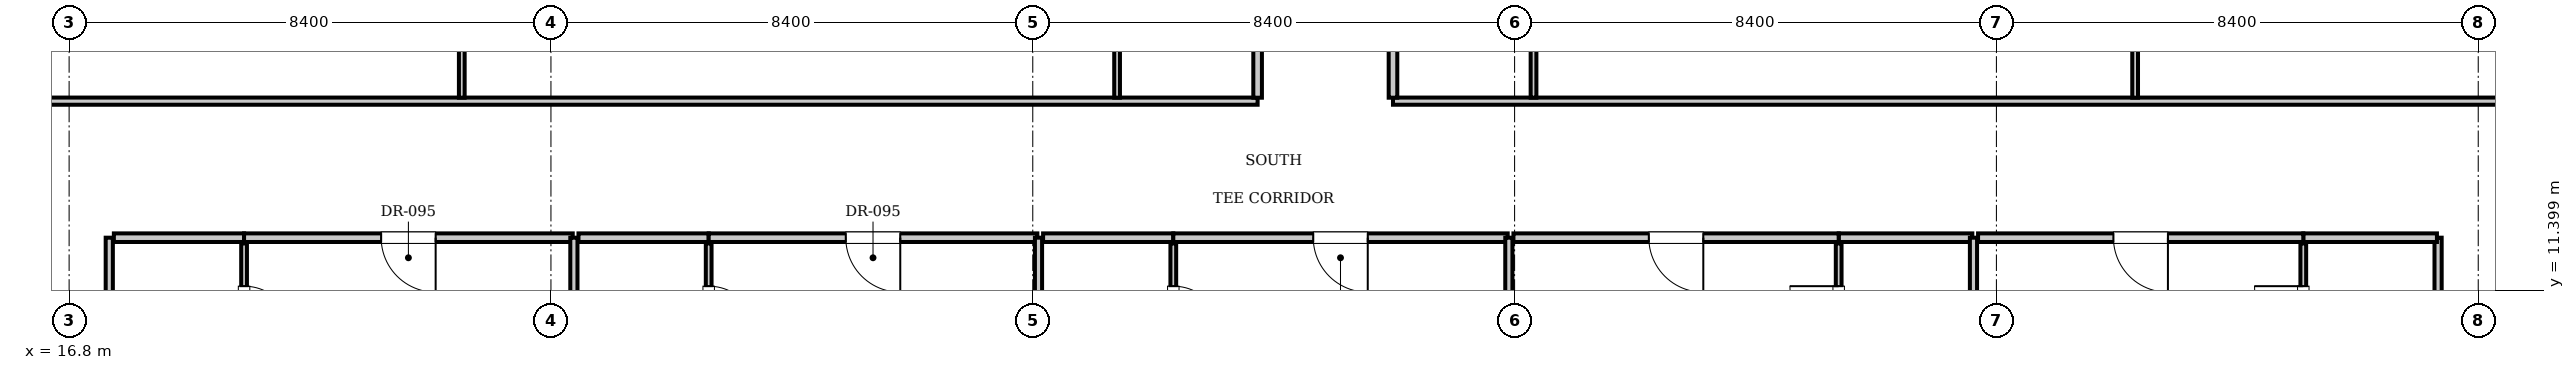
"""IFC4 building model, lengths in metres.
Left out: names, types, materials, properties, quantities, classifications, styles, units other than length and angle.
Written with IfcOpenShell. Run it as: python <this file> out.ifc"""

import sys

from ifc_helpers import new_model, si_unit, direction, frame, frame_2d, origin, place, context, subcontext, project, spatial, rectangle, extrude, element, fill, save


model = new_model("IFC4")
c1 = context("Model", 3, precision=1e-05, world=origin(), true_north=direction((0.0, 1.0)))
c2 = subcontext(c1, "Body", "Model", "MODEL_VIEW")
j1 = project(units=[si_unit("LENGTHUNIT", "METRE"), si_unit("PLANEANGLEUNIT", "RADIAN")], contexts=[c1])
p1 = place(None, origin())
s1 = spatial("IfcSite", under=j1, at=p1, CompositionType="ELEMENT")
p2 = place(p1, origin())
s2 = spatial("IfcBuilding", under=s1, at=p2, CompositionType="ELEMENT")
p3 = place(p2, frame((0.0, 0.0, 181.3)))
s3 = spatial("IfcBuildingStorey", under=s2, at=p3, CompositionType="ELEMENT", Elevation=181.3)
for number, where, z_axis, x_axis in (
    (1, (17.5, 9.0, 0.0), (0.0, 0.0, 1.0), (0.0, 1.0, 0.0)),
    (2, (58.1, 9.0, 0.0), (0.0, 0.0, 1.0), (0.0, 1.0, 0.0)),
):
    element("IfcWall", number, at=place(p3, frame(where, z_axis=z_axis, x_axis=x_axis)), inside=s3, PredefinedType="PARTITIONING", context=c2, shape_type="SweptSolid", body=[
        extrude(rectangle(XDim=3.32, YDim=0.125, at=frame_2d((1.66, 0.0))), origin(), (0.0, 0.0, 1.0), 3.61),
    ])
p4 = place(p3, frame((17.58, 12.32, 0.0), z_axis=(0.0, 0.0, 1.0), x_axis=(1.0, 0.0, 0.0)))
e3 = element("IfcWall", 3, at=p4, inside=s3, PredefinedType="PARTITIONING", context=c2, shape_type="SweptSolid", body=[
    extrude(rectangle(XDim=2.27, YDim=0.15, at=frame_2d((1.135, 0.0))), origin(), (0.0, 0.0, 1.0), 3.61),
])
p5 = place(p3, frame((19.85, 9.88, 0.0), z_axis=(0.0, 0.0, 1.0), x_axis=(0.0, 1.0, 0.0)))
e4 = element("IfcWall", 4, at=p5, inside=s3, PredefinedType="PARTITIONING", context=c2, shape_type="SweptSolid", body=[
    extrude(rectangle(XDim=2.34, YDim=0.1, at=frame_2d((1.17, 0.0))), origin(), (0.0, 0.0, 1.0), 3.61),
])
p6 = place(p5, frame((0.745, 0.0, 0.0)))
e5 = element("IfcOpeningElement", 5, at=p6, cuts=e4, PredefinedType="OPENING", context=c2, shape_type="SweptSolid", body=[
    extrude(rectangle(XDim=0.85, YDim=2.1, at=frame_2d((0.425, 1.05))), frame((0.0, 0.06, 0.0), z_axis=(0.0, -1.0, 0.0), x_axis=(1.0, 0.0, 0.0)), (0.0, 0.0, 1.0), 0.12),
])
p7 = place(p3, frame((19.85, 12.32, 0.0), z_axis=(0.0, 0.0, 1.0), x_axis=(1.0, 0.0, 0.0)))
e6 = element("IfcWall", 6, at=p7, inside=s3, PredefinedType="PARTITIONING", context=c2, shape_type="SweptSolid", body=[
    extrude(rectangle(XDim=5.73, YDim=0.15, at=frame_2d((2.865, 0.0))), origin(), (0.0, 0.0, 1.0), 3.61),
])
p8 = place(p7, frame((2.39, 0.0, 0.0)))
e7 = element("IfcOpeningElement", 7, at=p8, cuts=e6, PredefinedType="OPENING", context=c2, shape_type="SweptSolid", body=[
    extrude(rectangle(XDim=0.95, YDim=2.15, at=frame_2d((0.475, 1.075))), frame((0.0, 0.085, 0.0), z_axis=(0.0, -1.0, 0.0), x_axis=(1.0, 0.0, 0.0)), (0.0, 0.0, 1.0), 0.17),
])
p9 = place(p3, frame((25.6, 4.7, 0.0), z_axis=(0.0, 0.0, 1.0), x_axis=(0.0, 1.0, 0.0)))
e8 = element("IfcWall", 8, at=p9, inside=s3, PredefinedType="PARTITIONING", context=c2, shape_type="SweptSolid", body=[
    extrude(rectangle(XDim=7.62, YDim=0.125, at=frame_2d((3.81, 0.0))), origin(), (0.0, 0.0, 1.0), 3.61),
])
p10 = place(p3, frame((25.68, 12.32, 0.0), z_axis=(0.0, 0.0, 1.0), x_axis=(1.0, 0.0, 0.0)))
e9 = element("IfcWall", 9, at=p10, inside=s3, PredefinedType="PARTITIONING", context=c2, shape_type="SweptSolid", body=[
    extrude(rectangle(XDim=2.27, YDim=0.15, at=frame_2d((1.135, 0.0))), origin(), (0.0, 0.0, 1.0), 3.61),
])
p11 = place(p3, frame((27.95, 9.88, 0.0), z_axis=(0.0, 0.0, 1.0), x_axis=(0.0, 1.0, 0.0)))
e10 = element("IfcWall", 10, at=p11, inside=s3, PredefinedType="PARTITIONING", context=c2, shape_type="SweptSolid", body=[
    extrude(rectangle(XDim=2.34, YDim=0.1, at=frame_2d((1.17, 0.0))), origin(), (0.0, 0.0, 1.0), 3.61),
])
p12 = place(p11, frame((0.745, 0.0, 0.0)))
e11 = element("IfcOpeningElement", 11, at=p12, cuts=e10, PredefinedType="OPENING", context=c2, shape_type="SweptSolid", body=[
    extrude(rectangle(XDim=0.85, YDim=2.1, at=frame_2d((0.425, 1.05))), frame((0.0, 0.06, 0.0), z_axis=(0.0, -1.0, 0.0), x_axis=(1.0, 0.0, 0.0)), (0.0, 0.0, 1.0), 0.12),
])
p13 = place(p3, frame((27.95, 12.32, 0.0), z_axis=(0.0, 0.0, 1.0), x_axis=(1.0, 0.0, 0.0)))
e12 = element("IfcWall", 12, at=p13, inside=s3, PredefinedType="PARTITIONING", context=c2, shape_type="SweptSolid", body=[
    extrude(rectangle(XDim=5.73, YDim=0.15, at=frame_2d((2.865, 0.0))), origin(), (0.0, 0.0, 1.0), 3.61),
])
p14 = place(p13, frame((2.39, 0.0, 0.0)))
e13 = element("IfcOpeningElement", 13, at=p14, cuts=e12, PredefinedType="OPENING", context=c2, shape_type="SweptSolid", body=[
    extrude(rectangle(XDim=0.95, YDim=2.15, at=frame_2d((0.475, 1.075))), frame((0.0, 0.085, 0.0), z_axis=(0.0, -1.0, 0.0), x_axis=(1.0, 0.0, 0.0)), (0.0, 0.0, 1.0), 0.17),
])
p15 = place(p3, frame((33.7, 4.7, 0.0), z_axis=(0.0, 0.0, 1.0), x_axis=(0.0, 1.0, 0.0)))
e14 = element("IfcWall", 14, at=p15, inside=s3, PredefinedType="PARTITIONING", context=c2, shape_type="SweptSolid", body=[
    extrude(rectangle(XDim=7.62, YDim=0.125, at=frame_2d((3.81, 0.0))), origin(), (0.0, 0.0, 1.0), 3.007),
])
p16 = place(p3, frame((33.78, 12.32, 0.0), z_axis=(0.0, 0.0, 1.0), x_axis=(1.0, 0.0, 0.0)))
e15 = element("IfcWall", 15, at=p16, inside=s3, PredefinedType="PARTITIONING", context=c2, shape_type="SweptSolid", body=[
    extrude(rectangle(XDim=2.27, YDim=0.15, at=frame_2d((1.135, 0.0))), origin(), (0.0, 0.0, 1.0), 3.61),
])
p17 = place(p3, frame((36.05, 9.88, 0.0), z_axis=(0.0, 0.0, 1.0), x_axis=(0.0, 1.0, 0.0)))
e16 = element("IfcWall", 16, at=p17, inside=s3, PredefinedType="PARTITIONING", context=c2, shape_type="SweptSolid", body=[
    extrude(rectangle(XDim=2.34, YDim=0.1, at=frame_2d((1.17, 0.0))), origin(), (0.0, 0.0, 1.0), 3.61),
])
p18 = place(p17, frame((0.745, 0.0, 0.0)))
e17 = element("IfcOpeningElement", 17, at=p18, cuts=e16, PredefinedType="OPENING", context=c2, shape_type="SweptSolid", body=[
    extrude(rectangle(XDim=0.85, YDim=2.1, at=frame_2d((0.425, 1.05))), frame((0.0, 0.06, 0.0), z_axis=(0.0, -1.0, 0.0), x_axis=(1.0, 0.0, 0.0)), (0.0, 0.0, 1.0), 0.12),
])
p19 = place(p3, frame((36.05, 12.32, 0.0), z_axis=(0.0, 0.0, 1.0), x_axis=(1.0, 0.0, 0.0)))
e18 = element("IfcWall", 18, at=p19, inside=s3, PredefinedType="PARTITIONING", context=c2, shape_type="SweptSolid", body=[
    extrude(rectangle(XDim=5.83, YDim=0.15, at=frame_2d((2.915, 0.0))), origin(), (0.0, 0.0, 1.0), 3.61),
])
p20 = place(p19, frame((2.44, 0.0, 0.0)))
e19 = element("IfcOpeningElement", 19, at=p20, cuts=e18, PredefinedType="OPENING", context=c2, shape_type="SweptSolid", body=[
    extrude(rectangle(XDim=0.95, YDim=2.15, at=frame_2d((0.475, 1.075))), frame((0.0, 0.085, 0.0), z_axis=(0.0, -1.0, 0.0), x_axis=(1.0, 0.0, 0.0)), (0.0, 0.0, 1.0), 0.17),
])
p21 = place(p3, frame((41.9, 4.7, 0.0), z_axis=(0.0, 0.0, 1.0), x_axis=(0.0, 1.0, 0.0)))
e20 = element("IfcWall", 20, at=p21, inside=s3, PredefinedType="PARTITIONING", context=c2, shape_type="SweptSolid", body=[
    extrude(rectangle(XDim=7.62, YDim=0.125, at=frame_2d((3.81, 0.0))), origin(), (0.0, 0.0, 1.0), 3.007),
])
p22 = place(p3, frame((47.65, 12.32, 0.0), z_axis=(0.0, 0.0, 1.0), x_axis=(1.0, 0.0, 0.0)))
e21 = element("IfcWall", 21, at=p22, inside=s3, PredefinedType="PARTITIONING", context=c2, shape_type="SweptSolid", body=[
    extrude(rectangle(XDim=2.33, YDim=0.15, at=frame_2d((1.165, 0.0))), origin(), (0.0, 0.0, 1.0), 3.61),
])
p23 = place(p3, frame((47.65, 9.88, 0.0), z_axis=(0.0, 0.0, 1.0), x_axis=(0.0, 1.0, 0.0)))
e22 = element("IfcWall", 22, at=p23, inside=s3, PredefinedType="PARTITIONING", context=c2, shape_type="SweptSolid", body=[
    extrude(rectangle(XDim=2.34, YDim=0.1, at=frame_2d((1.17, 0.0))), origin(), (0.0, 0.0, 1.0), 3.61),
])
p24 = place(p23, frame((0.745, 0.0, 0.0)))
e23 = element("IfcOpeningElement", 23, at=p24, cuts=e22, PredefinedType="OPENING", context=c2, shape_type="SweptSolid", body=[
    extrude(rectangle(XDim=0.85, YDim=2.1, at=frame_2d((0.425, 1.05))), frame((0.0, 0.06, 0.0), z_axis=(0.0, -1.0, 0.0), x_axis=(1.0, 0.0, 0.0)), (0.0, 0.0, 1.0), 0.12),
])
p25 = place(p3, frame((41.98, 12.32, 0.0), z_axis=(0.0, 0.0, 1.0), x_axis=(1.0, 0.0, 0.0)))
e24 = element("IfcWall", 24, at=p25, inside=s3, PredefinedType="PARTITIONING", context=c2, shape_type="SweptSolid", body=[
    extrude(rectangle(XDim=5.67, YDim=0.15, at=frame_2d((2.835, 0.0))), origin(), (0.0, 0.0, 1.0), 3.61),
])
p26 = place(p25, frame((2.36, 0.0, 0.0)))
e25 = element("IfcOpeningElement", 25, at=p26, cuts=e24, PredefinedType="OPENING", context=c2, shape_type="SweptSolid", body=[
    extrude(rectangle(XDim=0.95, YDim=2.15, at=frame_2d((0.475, 1.075))), frame((0.0, 0.085, 0.0), z_axis=(0.0, -1.0, 0.0), x_axis=(1.0, 0.0, 0.0)), (0.0, 0.0, 1.0), 0.17),
])
p27 = place(p3, frame((50.0, 4.7, 0.0), z_axis=(0.0, 0.0, 1.0), x_axis=(0.0, 1.0, 0.0)))
e26 = element("IfcWall", 26, at=p27, inside=s3, PredefinedType="PARTITIONING", context=c2, shape_type="SweptSolid", body=[
    extrude(rectangle(XDim=7.62, YDim=0.125, at=frame_2d((3.81, 0.0))), origin(), (0.0, 0.0, 1.0), 3.61),
])
p28 = place(p3, frame((55.75, 12.32, 0.0), z_axis=(0.0, 0.0, 1.0), x_axis=(1.0, 0.0, 0.0)))
e27 = element("IfcWall", 27, at=p28, inside=s3, PredefinedType="PARTITIONING", context=c2, shape_type="SweptSolid", body=[
    extrude(rectangle(XDim=2.33, YDim=0.15, at=frame_2d((1.165, 0.0))), origin(), (0.0, 0.0, 1.0), 3.61),
])
p29 = place(p3, frame((55.75, 9.88, 0.0), z_axis=(0.0, 0.0, 1.0), x_axis=(0.0, 1.0, 0.0)))
e28 = element("IfcWall", 28, at=p29, inside=s3, PredefinedType="PARTITIONING", context=c2, shape_type="SweptSolid", body=[
    extrude(rectangle(XDim=2.34, YDim=0.1, at=frame_2d((1.17, 0.0))), origin(), (0.0, 0.0, 1.0), 3.61),
])
p30 = place(p29, frame((0.745, 0.0, 0.0)))
e29 = element("IfcOpeningElement", 29, at=p30, cuts=e28, PredefinedType="OPENING", context=c2, shape_type="SweptSolid", body=[
    extrude(rectangle(XDim=0.85, YDim=2.1, at=frame_2d((0.425, 1.05))), frame((0.0, 0.06, 0.0), z_axis=(0.0, -1.0, 0.0), x_axis=(1.0, 0.0, 0.0)), (0.0, 0.0, 1.0), 0.12),
])
p31 = place(p3, frame((50.08, 12.32, 0.0), z_axis=(0.0, 0.0, 1.0), x_axis=(1.0, 0.0, 0.0)))
e30 = element("IfcWall", 30, at=p31, inside=s3, PredefinedType="PARTITIONING", context=c2, shape_type="SweptSolid", body=[
    extrude(rectangle(XDim=5.67, YDim=0.15, at=frame_2d((2.835, 0.0))), origin(), (0.0, 0.0, 1.0), 3.61),
])
p32 = place(p31, frame((2.36, 0.0, 0.0)))
e31 = element("IfcOpeningElement", 31, at=p32, cuts=e30, PredefinedType="OPENING", context=c2, shape_type="SweptSolid", body=[
    extrude(rectangle(XDim=0.95, YDim=2.15, at=frame_2d((0.475, 1.075))), frame((0.0, 0.085, 0.0), z_axis=(0.0, -1.0, 0.0), x_axis=(1.0, 0.0, 0.0)), (0.0, 0.0, 1.0), 0.17),
])
p33 = place(p3, frame((13.2, 14.7, 0.0), z_axis=(0.0, 0.0, 1.0), x_axis=(1.0, 0.0, 0.0)))
e32 = element("IfcWall", 32, at=p33, inside=s3, PredefinedType="PARTITIONING", context=c2, shape_type="SweptSolid", body=[
    extrude(rectangle(XDim=24.32, YDim=0.125, at=frame_2d((12.16, 0.0))), origin(), (0.0, 0.0, 1.0), 3.61),
])
p34 = place(p3, frame((39.88, 14.7, 0.0), z_axis=(0.0, 0.0, 1.0), x_axis=(1.0, 0.0, 0.0)))
e33 = element("IfcWall", 33, at=p34, inside=s3, PredefinedType="PARTITIONING", context=c2, shape_type="SweptSolid", body=[
    extrude(rectangle(XDim=22.52, YDim=0.125, at=frame_2d((11.26, 0.0))), origin(), (0.0, 0.0, 1.0), 3.61),
])
p35 = place(p3, frame((37.52, 14.76, 0.0), z_axis=(0.0, 0.0, 1.0), x_axis=(0.0, 1.0, 0.0)))
e34 = element("IfcWall", 34, at=p35, inside=s3, PredefinedType="PARTITIONING", context=c2, shape_type="SweptSolid", body=[
    extrude(rectangle(XDim=1.89, YDim=0.15, at=frame_2d((0.945, 0.0))), origin(), (0.0, 0.0, 1.0), 3.61),
])
p36 = place(p3, frame((35.07, 14.76, 0.0), z_axis=(0.0, 0.0, 1.0), x_axis=(0.0, 1.0, 0.0)))
e35 = element("IfcWall", 35, at=p36, inside=s3, PredefinedType="PARTITIONING", context=c2, shape_type="SweptSolid", body=[
    extrude(rectangle(XDim=1.89, YDim=0.1, at=frame_2d((0.945, 0.0))), origin(), (0.0, 0.0, 1.0), 3.61),
])
p37 = place(p3, frame((23.646, 14.76, 0.0), z_axis=(0.0, 0.0, 1.0), x_axis=(0.0, 1.0, 0.0)))
e36 = element("IfcWall", 36, at=p37, inside=s3, PredefinedType="PARTITIONING", context=c2, shape_type="SweptSolid", body=[
    extrude(rectangle(XDim=3.98, YDim=0.1, at=frame_2d((1.99, 0.0))), origin(), (0.0, 0.0, 1.0), 3.61),
])
p38 = place(p37, frame((1.54, 0.0, 0.0)))
e37 = element("IfcOpeningElement", 37, at=p38, cuts=e36, PredefinedType="OPENING", context=c2, shape_type="SweptSolid", body=[
    extrude(rectangle(XDim=0.9, YDim=2.1, at=frame_2d((0.45, 1.05))), frame((0.0, 0.06, 0.0), z_axis=(0.0, -1.0, 0.0), x_axis=(1.0, 0.0, 0.0)), (0.0, 0.0, 1.0), 0.12),
])
p39 = place(p3, frame((39.88, 14.76, 0.0), z_axis=(0.0, 0.0, 1.0), x_axis=(0.0, 1.0, 0.0)))
e38 = element("IfcWall", 38, at=p39, inside=s3, PredefinedType="PARTITIONING", context=c2, shape_type="SweptSolid", body=[
    extrude(rectangle(XDim=1.89, YDim=0.15, at=frame_2d((0.945, 0.0))), origin(), (0.0, 0.0, 1.0), 3.61),
])
p40 = place(p3, frame((42.33, 14.76, 0.0), z_axis=(0.0, 0.0, 1.0), x_axis=(0.0, 1.0, 0.0)))
e39 = element("IfcWall", 39, at=p40, inside=s3, PredefinedType="PARTITIONING", context=c2, shape_type="SweptSolid", body=[
    extrude(rectangle(XDim=1.89, YDim=0.1, at=frame_2d((0.945, 0.0))), origin(), (0.0, 0.0, 1.0), 3.61),
])
p41 = place(p3, frame((52.818, 14.76, 0.0), z_axis=(0.0, 0.0, 1.0), x_axis=(0.0, 1.0, 0.0)))
e40 = element("IfcWall", 40, at=p41, inside=s3, PredefinedType="PARTITIONING", context=c2, shape_type="SweptSolid", body=[
    extrude(rectangle(XDim=3.98, YDim=0.1, at=frame_2d((1.99, 0.0))), origin(), (0.0, 0.0, 1.0), 3.61),
])
p42 = place(p41, frame((1.54, 0.0, 0.0)))
e41 = element("IfcOpeningElement", 41, at=p42, cuts=e40, PredefinedType="OPENING", context=c2, shape_type="SweptSolid", body=[
    extrude(rectangle(XDim=0.9, YDim=2.1, at=frame_2d((0.45, 1.05))), frame((0.0, 0.06, 0.0), z_axis=(0.0, -1.0, 0.0), x_axis=(1.0, 0.0, 0.0)), (0.0, 0.0, 1.0), 0.12),
])
p43 = place(p6, frame((0.85, 0.0, 0.0), z_axis=(0.0, 0.0, 1.0), x_axis=(-1.0, 0.0, 0.0)))
e42 = element("IfcDoor", 42, at=p43, inside=s3, OperationType="SINGLE_SWING_RIGHT", PredefinedType="DOOR", context=c2, shape_type="SweptSolid", body=[
    extrude(rectangle(XDim=0.85, YDim=2.1, at=frame_2d((0.425, 1.05))), frame((0.0, 0.025, 0.0), z_axis=(0.0, -1.0, 0.0), x_axis=(1.0, 0.0, 0.0)), (0.0, 0.0, 1.0), 0.05),
])
fill(e5, e42)
p44 = place(p8, frame((0.95, 0.0, 0.0), z_axis=(0.0, 0.0, 1.0), x_axis=(-1.0, 0.0, 0.0)))
e43 = element("IfcDoor", 43, at=p44, inside=s3, OperationType="SINGLE_SWING_LEFT", PredefinedType="DOOR", context=c2, shape_type="SweptSolid", body=[
    extrude(rectangle(XDim=0.95, YDim=2.15, at=frame_2d((0.475, 1.075))), frame((0.0, 0.025, 0.0), z_axis=(0.0, -1.0, 0.0), x_axis=(1.0, 0.0, 0.0)), (0.0, 0.0, 1.0), 0.05),
])
fill(e7, e43)
p45 = place(p12, frame((0.85, 0.0, 0.0), z_axis=(0.0, 0.0, 1.0), x_axis=(-1.0, 0.0, 0.0)))
e44 = element("IfcDoor", 44, at=p45, inside=s3, OperationType="SINGLE_SWING_RIGHT", PredefinedType="DOOR", context=c2, shape_type="SweptSolid", body=[
    extrude(rectangle(XDim=0.85, YDim=2.1, at=frame_2d((0.425, 1.05))), frame((0.0, 0.025, 0.0), z_axis=(0.0, -1.0, 0.0), x_axis=(1.0, 0.0, 0.0)), (0.0, 0.0, 1.0), 0.05),
])
fill(e11, e44)
p46 = place(p14, frame((0.95, 0.0, 0.0), z_axis=(0.0, 0.0, 1.0), x_axis=(-1.0, 0.0, 0.0)))
e45 = element("IfcDoor", 45, at=p46, inside=s3, OperationType="SINGLE_SWING_LEFT", PredefinedType="DOOR", context=c2, shape_type="SweptSolid", body=[
    extrude(rectangle(XDim=0.95, YDim=2.15, at=frame_2d((0.475, 1.075))), frame((0.0, 0.025, 0.0), z_axis=(0.0, -1.0, 0.0), x_axis=(1.0, 0.0, 0.0)), (0.0, 0.0, 1.0), 0.05),
])
fill(e13, e45)
p47 = place(p18, frame((0.85, 0.0, 0.0), z_axis=(0.0, 0.0, 1.0), x_axis=(-1.0, 0.0, 0.0)))
e46 = element("IfcDoor", 46, at=p47, inside=s3, OperationType="SINGLE_SWING_RIGHT", PredefinedType="DOOR", context=c2, shape_type="SweptSolid", body=[
    extrude(rectangle(XDim=0.85, YDim=2.1, at=frame_2d((0.425, 1.05))), frame((0.0, 0.025, 0.0), z_axis=(0.0, -1.0, 0.0), x_axis=(1.0, 0.0, 0.0)), (0.0, 0.0, 1.0), 0.05),
])
fill(e17, e46)
p48 = place(p20, frame((0.95, 0.0, 0.0), z_axis=(0.0, 0.0, 1.0), x_axis=(-1.0, 0.0, 0.0)))
e47 = element("IfcDoor", 47, at=p48, inside=s3, OperationType="SINGLE_SWING_LEFT", PredefinedType="DOOR", context=c2, shape_type="SweptSolid", body=[
    extrude(rectangle(XDim=0.95, YDim=2.15, at=frame_2d((0.475, 1.075))), frame((0.0, 0.025, 0.0), z_axis=(0.0, -1.0, 0.0), x_axis=(1.0, 0.0, 0.0)), (0.0, 0.0, 1.0), 0.05),
])
fill(e19, e47)
p49 = place(p24, origin())
e48 = element("IfcDoor", 48, at=p49, inside=s3, OperationType="SINGLE_SWING_RIGHT", PredefinedType="DOOR", context=c2, shape_type="SweptSolid", body=[
    extrude(rectangle(XDim=0.85, YDim=2.1, at=frame_2d((0.425, 1.05))), frame((0.0, 0.025, 0.0), z_axis=(0.0, -1.0, 0.0), x_axis=(1.0, 0.0, 0.0)), (0.0, 0.0, 1.0), 0.05),
])
fill(e23, e48)
p50 = place(p26, frame((0.95, 0.0, 0.0), z_axis=(0.0, 0.0, 1.0), x_axis=(-1.0, 0.0, 0.0)))
e49 = element("IfcDoor", 49, at=p50, inside=s3, OperationType="SINGLE_SWING_LEFT", PredefinedType="DOOR", context=c2, shape_type="SweptSolid", body=[
    extrude(rectangle(XDim=0.95, YDim=2.15, at=frame_2d((0.475, 1.075))), frame((0.0, 0.025, 0.0), z_axis=(0.0, -1.0, 0.0), x_axis=(1.0, 0.0, 0.0)), (0.0, 0.0, 1.0), 0.05),
])
fill(e25, e49)
p51 = place(p30, origin())
e50 = element("IfcDoor", 50, at=p51, inside=s3, OperationType="SINGLE_SWING_RIGHT", PredefinedType="DOOR", context=c2, shape_type="SweptSolid", body=[
    extrude(rectangle(XDim=0.85, YDim=2.1, at=frame_2d((0.425, 1.05))), frame((0.0, 0.025, 0.0), z_axis=(0.0, -1.0, 0.0), x_axis=(1.0, 0.0, 0.0)), (0.0, 0.0, 1.0), 0.05),
])
fill(e29, e50)
p52 = place(p32, frame((0.95, 0.0, 0.0), z_axis=(0.0, 0.0, 1.0), x_axis=(-1.0, 0.0, 0.0)))
e51 = element("IfcDoor", 51, at=p52, inside=s3, OperationType="SINGLE_SWING_LEFT", PredefinedType="DOOR", context=c2, shape_type="SweptSolid", body=[
    extrude(rectangle(XDim=0.95, YDim=2.15, at=frame_2d((0.475, 1.075))), frame((0.0, 0.025, 0.0), z_axis=(0.0, -1.0, 0.0), x_axis=(1.0, 0.0, 0.0)), (0.0, 0.0, 1.0), 0.05),
])
fill(e31, e51)
save(model, sys.argv[1])
